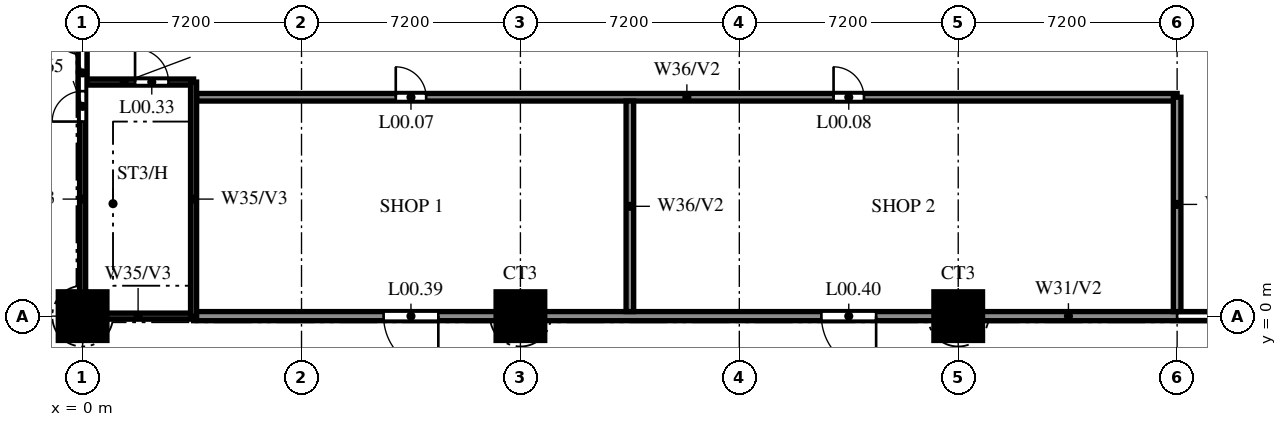
"""IFC4 building model, lengths in metres.
Left out: names, types, materials, properties, quantities, classifications, styles, units other than length and angle.
Written with IfcOpenShell. Run it as: python <this file> out.ifc"""

import sys

from ifc_helpers import new_model, si_unit, direction, frame, frame_2d, origin, origin_with_axes, origin_2d, place, context, subcontext, project, spatial, rectangle, circle, extrude, source, transform, mapped, element, fill, save


model = new_model("IFC4")
c1 = context("Model", 3, precision=1e-05, world=origin(), true_north=direction((0.0, 1.0)))
c2 = subcontext(c1, "Body", "Model", "MODEL_VIEW")
j1 = project(units=[si_unit("LENGTHUNIT", "METRE"), si_unit("PLANEANGLEUNIT", "RADIAN")], contexts=[c1])
p1 = place(None, origin())
s1 = spatial("IfcSite", under=j1, at=p1, CompositionType="ELEMENT")
p2 = place(p1, origin())
s2 = spatial("IfcBuilding", under=s1, at=p2, CompositionType="ELEMENT")
p3 = place(p2, origin())
s3 = spatial("IfcBuildingStorey", under=s2, at=p3, CompositionType="ELEMENT", Elevation=0.0)
m1 = source(origin(), c2, "Body", "SweptSolid", [
    extrude(circle(Radius=0.8, at=origin_2d()), origin(), (0.0, 0.0, 1.0), 7.4),
])
for number, where, z_axis, x_axis in (
    (1, (0.0, 0.0, 0.0), (0.0, 0.0, 1.0), (1.0, 0.0, 0.0)),
    (2, (14.4, 0.0, 0.0), (0.0, 0.0, 1.0), (1.0, 0.0, 0.0)),
    (3, (28.8, 0.0, 0.0), (0.0, 0.0, 1.0), (1.0, 0.0, 0.0)),
):
    element("IfcColumn", number, at=place(p3, frame(where, z_axis=z_axis, x_axis=x_axis)), inside=s3, PredefinedType="COLUMN", context=c2, shape_type="MappedRepresentation", body=[
        mapped(m1, transform((0.0, 0.0, 0.0))),
    ])
p4 = place(p3, frame((61.2, 0.0, 0.0), z_axis=(0.0, 0.0, 1.0), x_axis=(-1.0, 0.0, 0.0)))
e4 = element("IfcWall", 4, at=p4, inside=s3, PredefinedType="SOLIDWALL", context=c2, shape_type="SweptSolid", body=[
    extrude(rectangle(XDim=57.55, YDim=0.3, at=frame_2d((28.775, 0.0))), origin(), (0.0, 0.0, 1.0), 7.4),
])
p5 = place(p4, frame((49.5, 0.0, 0.0)))
e5 = element("IfcOpeningElement", 5, at=p5, cuts=e4, PredefinedType="OPENING", context=c2, shape_type="SweptSolid", body=[
    extrude(rectangle(XDim=1.8, YDim=2.1, at=frame_2d((0.9, 1.05))), frame((0.0, 0.16, 0.0), z_axis=(0.0, -1.0, 0.0), x_axis=(1.0, 0.0, 0.0)), (0.0, 0.0, 1.0), 0.32),
])
p6 = place(p4, frame((35.1, 0.0, 0.0)))
e6 = element("IfcOpeningElement", 6, at=p6, cuts=e4, PredefinedType="OPENING", context=c2, shape_type="SweptSolid", body=[
    extrude(rectangle(XDim=1.8, YDim=2.1, at=frame_2d((0.9, 1.05))), frame((0.0, 0.16, 0.0), z_axis=(0.0, -1.0, 0.0), x_axis=(1.0, 0.0, 0.0)), (0.0, 0.0, 1.0), 0.32),
])
p7 = place(p4, frame((12.6, 0.0, 0.0)))
e7 = element("IfcOpeningElement", 7, at=p7, cuts=e4, PredefinedType="OPENING", context=c2, shape_type="SweptSolid", body=[
    extrude(rectangle(XDim=2.4, YDim=2.1, at=frame_2d((1.2, 1.05))), frame((0.0, 0.16, 0.0), z_axis=(0.0, -1.0, 0.0), x_axis=(1.0, 0.0, 0.0)), (0.0, 0.0, 1.0), 0.32),
])
p8 = place(p4, frame((9.6, 0.0, 0.0)))
e8 = element("IfcOpeningElement", 8, at=p8, cuts=e4, PredefinedType="OPENING", context=c2, shape_type="SweptSolid", body=[
    extrude(rectangle(XDim=2.4, YDim=2.1, at=frame_2d((1.2, 1.05))), frame((0.0, 0.16, 0.0), z_axis=(0.0, -1.0, 0.0), x_axis=(1.0, 0.0, 0.0)), (0.0, 0.0, 1.0), 0.32),
])
p9 = place(p4, frame((6.6, 0.0, 0.0)))
e9 = element("IfcOpeningElement", 9, at=p9, cuts=e4, PredefinedType="OPENING", context=c2, shape_type="SweptSolid", body=[
    extrude(rectangle(XDim=2.4, YDim=2.1, at=frame_2d((1.2, 1.05))), frame((0.0, 0.16, 0.0), z_axis=(0.0, -1.0, 0.0), x_axis=(1.0, 0.0, 0.0)), (0.0, 0.0, 1.0), 0.32),
])
p10 = place(p3, origin_with_axes())
e10 = element("IfcWall", 10, at=p10, inside=s3, PredefinedType="SOLIDWALL", context=c2, shape_type="SweptSolid", body=[
    extrude(rectangle(XDim=3.65, YDim=0.2, at=frame_2d((1.825, 0.0))), origin(), (0.0, 0.0, 1.0), 7.4),
])
p11 = place(p3, frame((3.75, 7.2, 0.0), z_axis=(0.0, 0.0, 1.0), x_axis=(1.0, 0.0, 0.0)))
e11 = element("IfcWall", 11, at=p11, inside=s3, PredefinedType="SOLIDWALL", context=c2, shape_type="SweptSolid", body=[
    extrude(rectangle(XDim=32.25, YDim=0.25, at=frame_2d((16.125, 0.0))), origin(), (0.0, 0.0, 1.0), 6.2),
])
p12 = place(p11, frame((6.55, 0.0, 0.0)))
e12 = element("IfcOpeningElement", 12, at=p12, cuts=e11, PredefinedType="OPENING", context=c2, shape_type="SweptSolid", body=[
    extrude(rectangle(XDim=1.0, YDim=2.1, at=frame_2d((0.5, 1.05))), frame((0.0, 0.135, 0.0), z_axis=(0.0, -1.0, 0.0), x_axis=(1.0, 0.0, 0.0)), (0.0, 0.0, 1.0), 0.27),
])
p13 = place(p11, frame((20.95, 0.0, 0.0)))
e13 = element("IfcOpeningElement", 13, at=p13, cuts=e11, PredefinedType="OPENING", context=c2, shape_type="SweptSolid", body=[
    extrude(rectangle(XDim=1.0, YDim=2.1, at=frame_2d((0.5, 1.05))), frame((0.0, 0.135, 0.0), z_axis=(0.0, -1.0, 0.0), x_axis=(1.0, 0.0, 0.0)), (0.0, 0.0, 1.0), 0.27),
])
p14 = place(p3, frame((0.0, 7.7, 0.0), z_axis=(0.0, 0.0, 1.0), x_axis=(1.0, 0.0, 0.0)))
e14 = element("IfcWall", 14, at=p14, inside=s3, PredefinedType="SOLIDWALL", context=c2, shape_type="SweptSolid", body=[
    extrude(rectangle(XDim=3.65, YDim=0.2, at=frame_2d((1.825, 0.0))), origin(), (0.0, 0.0, 1.0), 7.4),
])
p15 = place(p14, frame((1.725, 0.0, 0.0)))
e15 = element("IfcOpeningElement", 15, at=p15, cuts=e14, PredefinedType="OPENING", context=c2, shape_type="SweptSolid", body=[
    extrude(rectangle(XDim=1.1, YDim=2.1, at=frame_2d((0.55, 1.05))), frame((0.0, 0.11, 0.0), z_axis=(0.0, -1.0, 0.0), x_axis=(1.0, 0.0, 0.0)), (0.0, 0.0, 1.0), 0.22),
])
p16 = place(p3, frame((0.0, 7.7, 0.0), z_axis=(0.0, 0.0, 1.0), x_axis=(0.0, 1.0, 0.0)))
e16 = element("IfcWall", 16, at=p16, inside=s3, PredefinedType="SOLIDWALL", context=c2, shape_type="SweptSolid", body=[
    extrude(rectangle(XDim=35.2, YDim=0.3, at=frame_2d((17.6, 0.0))), origin(), (0.0, 0.0, 1.0), 7.4),
])
p17 = place(p16, frame((16.9, 0.0, 0.0)))
e17 = element("IfcOpeningElement", 17, at=p17, cuts=e16, PredefinedType="OPENING", context=c2, shape_type="SweptSolid", body=[
    extrude(rectangle(XDim=3.6, YDim=3.0, at=frame_2d((1.8, 1.5))), frame((0.0, 0.16, 0.0), z_axis=(0.0, -1.0, 0.0), x_axis=(1.0, 0.0, 0.0)), (0.0, 0.0, 1.0), 0.32),
])
p18 = place(p16, frame((22.0, 0.0, 0.0)))
e18 = element("IfcOpeningElement", 18, at=p18, cuts=e16, PredefinedType="OPENING", context=c2, shape_type="SweptSolid", body=[
    extrude(rectangle(XDim=1.8, YDim=2.1, at=frame_2d((0.9, 1.05))), frame((0.0, 0.16, 0.0), z_axis=(0.0, -1.0, 0.0), x_axis=(1.0, 0.0, 0.0)), (0.0, 0.0, 1.0), 0.32),
])
p19 = place(p16, frame((4.0, 0.0, 0.0)))
e19 = element("IfcOpeningElement", 19, at=p19, cuts=e16, PredefinedType="OPENING", context=c2, shape_type="SweptSolid", body=[
    extrude(rectangle(XDim=2.4, YDim=2.1, at=frame_2d((1.2, 1.05))), frame((0.0, 0.16, 0.0), z_axis=(0.0, -1.0, 0.0), x_axis=(1.0, 0.0, 0.0)), (0.0, 0.0, 1.0), 0.32),
])
p20 = place(p16, frame((7.0, 0.0, 0.0)))
e20 = element("IfcOpeningElement", 20, at=p20, cuts=e16, PredefinedType="OPENING", context=c2, shape_type="SweptSolid", body=[
    extrude(rectangle(XDim=2.4, YDim=2.1, at=frame_2d((1.2, 1.05))), frame((0.0, 0.16, 0.0), z_axis=(0.0, -1.0, 0.0), x_axis=(1.0, 0.0, 0.0)), (0.0, 0.0, 1.0), 0.32),
])
p21 = place(p16, frame((28.7, 0.0, 0.0)))
e21 = element("IfcOpeningElement", 21, at=p21, cuts=e16, PredefinedType="OPENING", context=c2, shape_type="SweptSolid", body=[
    extrude(rectangle(XDim=3.6, YDim=3.0, at=frame_2d((1.8, 1.5))), frame((0.0, 0.16, 0.0), z_axis=(0.0, -1.0, 0.0), x_axis=(1.0, 0.0, 0.0)), (0.0, 0.0, 1.0), 0.32),
])
p22 = place(p16, frame((32.6, 0.0, 0.0)))
e22 = element("IfcOpeningElement", 22, at=p22, cuts=e16, PredefinedType="OPENING", context=c2, shape_type="SweptSolid", body=[
    extrude(rectangle(XDim=1.8, YDim=2.1, at=frame_2d((0.9, 1.05))), frame((0.0, 0.16, 0.0), z_axis=(0.0, -1.0, 0.0), x_axis=(1.0, 0.0, 0.0)), (0.0, 0.0, 1.0), 0.32),
])
p23 = place(p3, frame((0.0, 0.0, 0.0), z_axis=(0.0, 0.0, 1.0), x_axis=(0.0, 1.0, 0.0)))
e23 = element("IfcWall", 23, at=p23, inside=s3, PredefinedType="SOLIDWALL", context=c2, shape_type="SweptSolid", body=[
    extrude(rectangle(XDim=7.7, YDim=0.2, at=frame_2d((3.85, 0.0))), origin(), (0.0, 0.0, 1.0), 7.4),
])
p24 = place(p23, frame((6.4, 0.0, 0.0)))
e24 = element("IfcOpeningElement", 24, at=p24, cuts=e23, PredefinedType="OPENING", context=c2, shape_type="SweptSolid", body=[
    extrude(rectangle(XDim=1.0, YDim=2.1, at=frame_2d((0.5, 1.05))), frame((0.0, 0.11, 0.0), z_axis=(0.0, -1.0, 0.0), x_axis=(1.0, 0.0, 0.0)), (0.0, 0.0, 1.0), 0.22),
])
p25 = place(p3, frame((3.65, 0.0, 0.0), z_axis=(0.0, 0.0, 1.0), x_axis=(0.0, 1.0, 0.0)))
e25 = element("IfcWall", 25, at=p25, inside=s3, PredefinedType="SOLIDWALL", context=c2, shape_type="SweptSolid", body=[
    extrude(rectangle(XDim=7.7, YDim=0.2, at=frame_2d((3.85, 0.0))), origin(), (0.0, 0.0, 1.0), 7.4),
])
p26 = place(p3, frame((18.0, 0.15, 0.0), z_axis=(0.0, 0.0, 1.0), x_axis=(0.0, 1.0, 0.0)))
e26 = element("IfcWall", 26, at=p26, inside=s3, PredefinedType="SOLIDWALL", context=c2, shape_type="SweptSolid", body=[
    extrude(rectangle(XDim=6.925, YDim=0.25, at=frame_2d((3.462, 0.0))), origin(), (0.0, 0.0, 1.0), 6.2),
])
p27 = place(p3, frame((36.0, 0.15, 0.0), z_axis=(0.0, 0.0, 1.0), x_axis=(0.0, 1.0, 0.0)))
e27 = element("IfcWall", 27, at=p27, inside=s3, PredefinedType="SOLIDWALL", context=c2, shape_type="SweptSolid", body=[
    extrude(rectangle(XDim=7.05, YDim=0.25, at=frame_2d((3.525, 0.0))), origin(), (0.0, 0.0, 1.0), 6.2),
])
p28 = place(p12, origin())
e28 = element("IfcDoor", 28, at=p28, inside=s3, OperationType="SINGLE_SWING_LEFT", PredefinedType="DOOR", context=c2, shape_type="SweptSolid", body=[
    extrude(rectangle(XDim=1.0, YDim=2.1, at=frame_2d((0.5, 1.05))), frame((0.0, 0.025, 0.0), z_axis=(0.0, -1.0, 0.0), x_axis=(1.0, 0.0, 0.0)), (0.0, 0.0, 1.0), 0.05),
])
fill(e12, e28)
p29 = place(p13, origin())
e29 = element("IfcDoor", 29, at=p29, inside=s3, OperationType="SINGLE_SWING_RIGHT", PredefinedType="DOOR", context=c2, shape_type="SweptSolid", body=[
    extrude(rectangle(XDim=1.0, YDim=2.1, at=frame_2d((0.5, 1.05))), frame((0.0, 0.025, 0.0), z_axis=(0.0, -1.0, 0.0), x_axis=(1.0, 0.0, 0.0)), (0.0, 0.0, 1.0), 0.05),
])
fill(e13, e29)
p30 = place(p15, origin())
e30 = element("IfcDoor", 30, at=p30, inside=s3, OperationType="SINGLE_SWING_RIGHT", PredefinedType="DOOR", context=c2, shape_type="SweptSolid", body=[
    extrude(rectangle(XDim=1.1, YDim=2.1, at=frame_2d((0.55, 1.05))), frame((0.0, 0.025, 0.0), z_axis=(0.0, -1.0, 0.0), x_axis=(1.0, 0.0, 0.0)), (0.0, 0.0, 1.0), 0.05),
])
fill(e15, e30)
p31 = place(p5, origin())
e31 = element("IfcDoor", 31, at=p31, inside=s3, OperationType="DOUBLE_DOOR_SINGLE_SWING", PredefinedType="DOOR", context=c2, shape_type="SweptSolid", body=[
    extrude(rectangle(XDim=1.8, YDim=2.1, at=frame_2d((0.9, 1.05))), frame((0.0, 0.025, 0.0), z_axis=(0.0, -1.0, 0.0), x_axis=(1.0, 0.0, 0.0)), (0.0, 0.0, 1.0), 0.05),
])
fill(e5, e31)
p32 = place(p6, origin())
e32 = element("IfcDoor", 32, at=p32, inside=s3, OperationType="DOUBLE_DOOR_SINGLE_SWING", PredefinedType="DOOR", context=c2, shape_type="SweptSolid", body=[
    extrude(rectangle(XDim=1.8, YDim=2.1, at=frame_2d((0.9, 1.05))), frame((0.0, 0.025, 0.0), z_axis=(0.0, -1.0, 0.0), x_axis=(1.0, 0.0, 0.0)), (0.0, 0.0, 1.0), 0.05),
])
fill(e6, e32)
p33 = place(p24, origin())
e33 = element("IfcDoor", 33, at=p33, inside=s3, OperationType="SINGLE_SWING_RIGHT", PredefinedType="DOOR", context=c2, shape_type="SweptSolid", body=[
    extrude(rectangle(XDim=1.0, YDim=2.1, at=frame_2d((0.5, 1.05))), frame((0.0, 0.025, 0.0), z_axis=(0.0, -1.0, 0.0), x_axis=(1.0, 0.0, 0.0)), (0.0, 0.0, 1.0), 0.05),
])
fill(e24, e33)
save(model, sys.argv[1])
